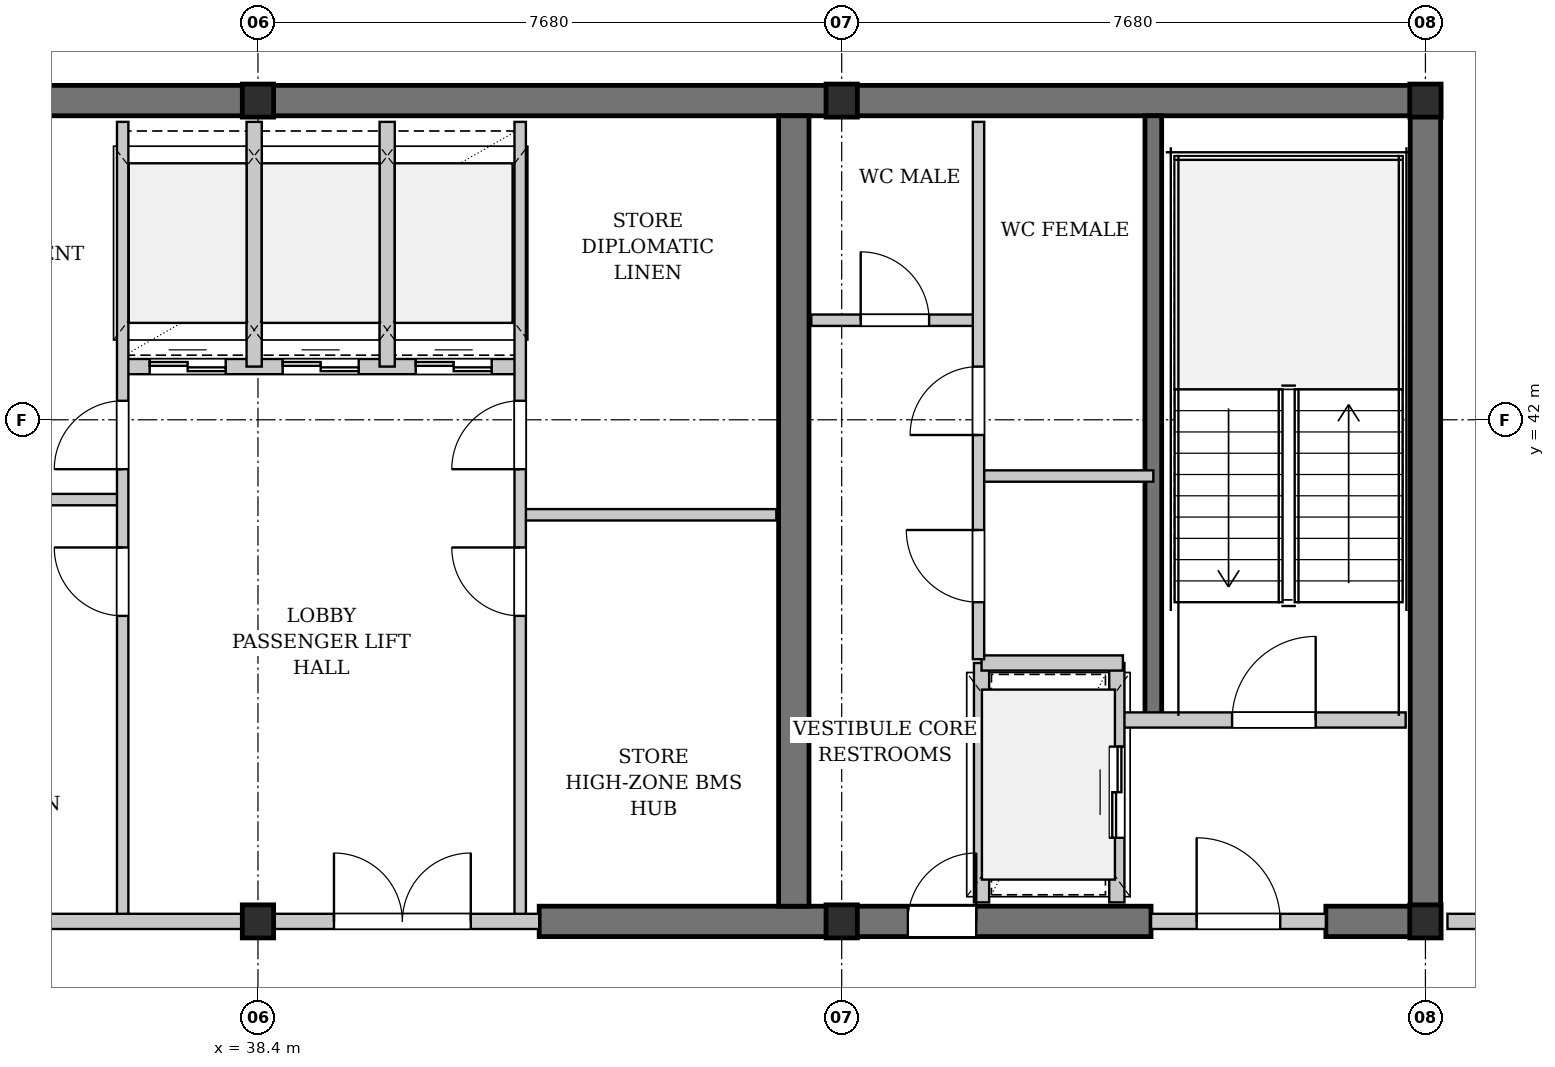
"""IFC4 building model, lengths in metres.
Left out: names, types, materials, properties, quantities, classifications, styles, units other than length and angle.
Written with IfcOpenShell. Run it as: python <this file> out.ifc"""

import sys

from ifc_helpers import new_model, si_unit, direction, frame, frame_2d, origin, origin_2d, place, context, subcontext, project, spatial, rectangle, i_section, extrude, element, fill, save


model = new_model("IFC4")
c1 = context("Model", 3, precision=1e-05, world=origin(), true_north=direction((0.0, 1.0)))
c2 = subcontext(c1, "Body", "Model", "MODEL_VIEW")
j1 = project(units=[si_unit("LENGTHUNIT", "METRE"), si_unit("PLANEANGLEUNIT", "RADIAN")], contexts=[c1])
p1 = place(None, origin())
s1 = spatial("IfcSite", under=j1, at=p1, CompositionType="ELEMENT")
p2 = place(p1, origin())
s2 = spatial("IfcBuilding", under=s1, at=p2, CompositionType="ELEMENT")
p3 = place(p2, frame((0.0, 0.0, 247.4)))
s3 = spatial("IfcBuildingStorey", under=s2, at=p3, CompositionType="ELEMENT", Elevation=247.4)
p4 = place(p3, frame((22.84, 46.2, 0.0), z_axis=(0.0, 0.0, 1.0), x_axis=(1.0, 0.0, 0.0)))
e1 = element("IfcWall", 1, at=p4, inside=s3, PredefinedType="SHEAR", context=c2, shape_type="SweptSolid", body=[
    extrude(rectangle(XDim=31.12, YDim=0.4, at=frame_2d((15.56, 0.0))), origin(), (0.0, 0.0, 1.0), 3.68),
])
p5 = place(p3, frame((42.1, 35.4, 0.0), z_axis=(0.0, 0.0, 1.0), x_axis=(1.0, 0.0, 0.0)))
e2 = element("IfcWall", 2, at=p5, inside=s3, PredefinedType="SHEAR", context=c2, shape_type="SweptSolid", body=[
    extrude(rectangle(XDim=8.05, YDim=0.4, at=frame_2d((4.025, 0.0))), origin(), (0.0, 0.0, 1.0), 3.68),
])
p6 = place(p5, frame((4.85, 0.0, 0.0)))
e3 = element("IfcOpeningElement", 3, at=p6, cuts=e2, PredefinedType="OPENING", context=c2, shape_type="SweptSolid", body=[
    extrude(rectangle(XDim=0.9, YDim=2.15, at=frame_2d((0.45, 1.075))), frame((0.0, 0.21, 0.0), z_axis=(0.0, -1.0, 0.0), x_axis=(1.0, 0.0, 0.0)), (0.0, 0.0, 1.0), 0.42),
])
p7 = place(p3, frame((52.45, 35.4, 0.0), z_axis=(0.0, 0.0, 1.0), x_axis=(1.0, 0.0, 0.0)))
e4 = element("IfcWall", 4, at=p7, inside=s3, PredefinedType="SHEAR", context=c2, shape_type="SweptSolid", body=[
    extrude(rectangle(XDim=1.51, YDim=0.4, at=frame_2d((0.755, 0.0))), origin(), (0.0, 0.0, 1.0), 3.68),
])
for number, where, z_axis, x_axis in (
    (5, (45.45, 35.6, 0.0), (0.0, 0.0, 1.0), (0.0, 1.0, 0.0)),
    (6, (53.76, 35.6, 0.0), (0.0, 0.0, 1.0), (0.0, 1.0, 0.0)),
):
    element("IfcWall", number, at=place(p3, frame(where, z_axis=z_axis, x_axis=x_axis)), inside=s3, PredefinedType="SHEAR", context=c2, shape_type="SweptSolid", body=[
        extrude(rectangle(XDim=10.4, YDim=0.4, at=frame_2d((5.2, 0.0))), origin(), (0.0, 0.0, 1.0), 3.68),
    ])
p8 = place(p3, frame((50.18, 38.05, 0.0), z_axis=(0.0, 0.0, 1.0), x_axis=(0.0, 1.0, 0.0)))
e7 = element("IfcWall", 7, at=p8, inside=s3, PredefinedType="SHEAR", context=c2, shape_type="SweptSolid", body=[
    extrude(rectangle(XDim=7.95, YDim=0.22, at=frame_2d((3.975, 0.0))), origin(), (0.0, 0.0, 1.0), 3.68),
])
for number, where, z_axis, x_axis in (
    (8, (38.4, 35.4, 0.0), (0.0, 0.0, 1.0), (1.0, 0.0, 0.0)),
    (9, (38.4, 46.2, 0.0), (0.0, 0.0, 1.0), (1.0, 0.0, 0.0)),
    (10, (46.08, 35.4, 0.0), (0.0, 0.0, 1.0), (1.0, 0.0, 0.0)),
    (11, (46.08, 46.2, 0.0), (0.0, 0.0, 1.0), (1.0, 0.0, 0.0)),
    (12, (53.76, 35.4, 0.0), (0.0, 0.0, 1.0), (1.0, 0.0, 0.0)),
    (13, (53.76, 46.2, 0.0), (0.0, 0.0, 1.0), (1.0, 0.0, 0.0)),
):
    element("IfcColumn", number, at=place(p3, frame(where, z_axis=z_axis, x_axis=x_axis)), inside=s3, PredefinedType="COLUMN", context=c2, shape_type="SweptSolid", body=[
        extrude(i_section(OverallWidth=0.412, OverallDepth=0.435, WebThickness=0.036, FlangeThickness=0.058, FilletRadius=0.015, at=origin_2d()), origin(), (0.0, 0.0, 1.0), 3.9),
    ])
p9 = place(p3, frame((35.6, 35.4, 0.0), z_axis=(0.0, 0.0, 1.0), x_axis=(1.0, 0.0, 0.0)))
e14 = element("IfcWall", 14, at=p9, inside=s3, PredefinedType="PARTITIONING", context=c2, shape_type="SweptSolid", body=[
    extrude(rectangle(XDim=6.5, YDim=0.2, at=frame_2d((3.25, 0.0))), origin(), (0.0, 0.0, 1.0), 2.861),
])
p10 = place(p9, frame((3.8, 0.0, 0.0)))
e15 = element("IfcOpeningElement", 15, at=p10, cuts=e14, PredefinedType="OPENING", context=c2, shape_type="SweptSolid", body=[
    extrude(rectangle(XDim=1.8, YDim=2.3, at=frame_2d((0.9, 1.15))), frame((0.0, 0.11, 0.0), z_axis=(0.0, -1.0, 0.0), x_axis=(1.0, 0.0, 0.0)), (0.0, 0.0, 1.0), 0.22),
])
p11 = place(p3, frame((36.6, 42.7, 0.0), z_axis=(0.0, 0.0, 1.0), x_axis=(1.0, 0.0, 0.0)))
e16 = element("IfcWall", 16, at=p11, inside=s3, PredefinedType="PARTITIONING", context=c2, shape_type="SweptSolid", body=[
    extrude(rectangle(XDim=5.25, YDim=0.2, at=frame_2d((2.625, 0.0))), origin(), (0.0, 0.0, 1.0), 3.68),
])
p12 = place(p11, frame((0.375, 0.0, 0.0)))
e17 = element("IfcOpeningElement", 17, at=p12, cuts=e16, PredefinedType="OPENING", context=c2, shape_type="SweptSolid", body=[
    extrude(rectangle(XDim=1.0, YDim=2.2, at=frame_2d((0.5, 1.1))), frame((0.0, 0.11, 0.0), z_axis=(0.0, -1.0, 0.0), x_axis=(1.0, 0.0, 0.0)), (0.0, 0.0, 1.0), 0.22),
])
p13 = place(p11, frame((2.125, 0.0, 0.0)))
e18 = element("IfcOpeningElement", 18, at=p13, cuts=e16, PredefinedType="OPENING", context=c2, shape_type="SweptSolid", body=[
    extrude(rectangle(XDim=1.0, YDim=2.2, at=frame_2d((0.5, 1.1))), frame((0.0, 0.11, 0.0), z_axis=(0.0, -1.0, 0.0), x_axis=(1.0, 0.0, 0.0)), (0.0, 0.0, 1.0), 0.22),
])
p14 = place(p11, frame((3.875, 0.0, 0.0)))
e19 = element("IfcOpeningElement", 19, at=p14, cuts=e16, PredefinedType="OPENING", context=c2, shape_type="SweptSolid", body=[
    extrude(rectangle(XDim=1.0, YDim=2.2, at=frame_2d((0.5, 1.1))), frame((0.0, 0.11, 0.0), z_axis=(0.0, -1.0, 0.0), x_axis=(1.0, 0.0, 0.0)), (0.0, 0.0, 1.0), 0.22),
])
p15 = place(p3, frame((38.35, 42.7, 0.0), z_axis=(0.0, 0.0, 1.0), x_axis=(0.0, 1.0, 0.0)))
e20 = element("IfcWall", 20, at=p15, inside=s3, PredefinedType="PARTITIONING", context=c2, shape_type="SweptSolid", body=[
    extrude(rectangle(XDim=3.22, YDim=0.2, at=frame_2d((1.61, 0.0))), origin(), (0.0, 0.0, 1.0), 2.861),
])
p16 = place(p3, frame((40.1, 42.7, 0.0), z_axis=(0.0, 0.0, 1.0), x_axis=(0.0, 1.0, 0.0)))
e21 = element("IfcWall", 21, at=p16, inside=s3, PredefinedType="PARTITIONING", context=c2, shape_type="SweptSolid", body=[
    extrude(rectangle(XDim=3.22, YDim=0.2, at=frame_2d((1.61, 0.0))), origin(), (0.0, 0.0, 1.0), 3.68),
])
p17 = place(p3, frame((33.05, 40.95, 0.0), z_axis=(0.0, 0.0, 1.0), x_axis=(1.0, 0.0, 0.0)))
e22 = element("IfcWall", 22, at=p17, inside=s3, PredefinedType="PARTITIONING", context=c2, shape_type="SweptSolid", body=[
    extrude(rectangle(XDim=3.57, YDim=0.15, at=frame_2d((1.785, 0.0))), origin(), (0.0, 0.0, 1.0), 3.68),
])
p18 = place(p3, frame((36.62, 35.5, 0.0), z_axis=(0.0, 0.0, 1.0), x_axis=(0.0, 1.0, 0.0)))
e23 = element("IfcWall", 23, at=p18, inside=s3, PredefinedType="PARTITIONING", context=c2, shape_type="SweptSolid", body=[
    extrude(rectangle(XDim=10.42, YDim=0.15, at=frame_2d((5.21, 0.0))), origin(), (0.0, 0.0, 1.0), 3.68),
])
p19 = place(p18, frame((3.92, 0.0, 0.0)))
e24 = element("IfcOpeningElement", 24, at=p19, cuts=e23, PredefinedType="OPENING", context=c2, shape_type="SweptSolid", body=[
    extrude(rectangle(XDim=0.9, YDim=2.15, at=frame_2d((0.45, 1.075))), frame((0.0, 0.085, 0.0), z_axis=(0.0, -1.0, 0.0), x_axis=(1.0, 0.0, 0.0)), (0.0, 0.0, 1.0), 0.17),
])
p20 = place(p18, frame((5.85, 0.0, 0.0)))
e25 = element("IfcOpeningElement", 25, at=p20, cuts=e23, PredefinedType="OPENING", context=c2, shape_type="SweptSolid", body=[
    extrude(rectangle(XDim=0.9, YDim=2.15, at=frame_2d((0.45, 1.075))), frame((0.0, 0.085, 0.0), z_axis=(0.0, -1.0, 0.0), x_axis=(1.0, 0.0, 0.0)), (0.0, 0.0, 1.0), 0.17),
])
p21 = place(p3, frame((41.85, 40.75, 0.0), z_axis=(0.0, 0.0, 1.0), x_axis=(1.0, 0.0, 0.0)))
e26 = element("IfcWall", 26, at=p21, inside=s3, PredefinedType="PARTITIONING", context=c2, shape_type="SweptSolid", body=[
    extrude(rectangle(XDim=3.37, YDim=0.15, at=frame_2d((1.685, 0.0))), origin(), (0.0, 0.0, 1.0), 3.68),
])
p22 = place(p3, frame((41.85, 35.5, 0.0), z_axis=(0.0, 0.0, 1.0), x_axis=(0.0, 1.0, 0.0)))
e27 = element("IfcWall", 27, at=p22, inside=s3, PredefinedType="PARTITIONING", context=c2, shape_type="SweptSolid", body=[
    extrude(rectangle(XDim=10.42, YDim=0.15, at=frame_2d((5.21, 0.0))), origin(), (0.0, 0.0, 1.0), 3.68),
])
p23 = place(p22, frame((3.92, 0.0, 0.0)))
e28 = element("IfcOpeningElement", 28, at=p23, cuts=e27, PredefinedType="OPENING", context=c2, shape_type="SweptSolid", body=[
    extrude(rectangle(XDim=0.9, YDim=2.15, at=frame_2d((0.45, 1.075))), frame((0.0, 0.085, 0.0), z_axis=(0.0, -1.0, 0.0), x_axis=(1.0, 0.0, 0.0)), (0.0, 0.0, 1.0), 0.17),
])
p24 = place(p22, frame((5.85, 0.0, 0.0)))
e29 = element("IfcOpeningElement", 29, at=p24, cuts=e27, PredefinedType="OPENING", context=c2, shape_type="SweptSolid", body=[
    extrude(rectangle(XDim=0.9, YDim=2.15, at=frame_2d((0.45, 1.075))), frame((0.0, 0.085, 0.0), z_axis=(0.0, -1.0, 0.0), x_axis=(1.0, 0.0, 0.0)), (0.0, 0.0, 1.0), 0.17),
])
p25 = place(p3, frame((49.78, 38.05, 0.0), z_axis=(0.0, 0.0, 1.0), x_axis=(1.0, 0.0, 0.0)))
e30 = element("IfcWall", 30, at=p25, inside=s3, PredefinedType="PARTITIONING", context=c2, shape_type="SweptSolid", body=[
    extrude(rectangle(XDim=3.72, YDim=0.2, at=frame_2d((1.86, 0.0))), origin(), (0.0, 0.0, 1.0), 3.68),
])
p26 = place(p25, frame((1.436, 0.0, 0.0)))
e31 = element("IfcOpeningElement", 31, at=p26, cuts=e30, PredefinedType="OPENING", context=c2, shape_type="SweptSolid", body=[
    extrude(rectangle(XDim=1.1, YDim=2.15, at=frame_2d((0.55, 1.075))), frame((0.0, 0.11, 0.0), z_axis=(0.0, -1.0, 0.0), x_axis=(1.0, 0.0, 0.0)), (0.0, 0.0, 1.0), 0.22),
])
p27 = place(p3, frame((50.15, 35.4, 0.0), z_axis=(0.0, 0.0, 1.0), x_axis=(1.0, 0.0, 0.0)))
e32 = element("IfcWall", 32, at=p27, inside=s3, PredefinedType="PARTITIONING", context=c2, shape_type="SweptSolid", body=[
    extrude(rectangle(XDim=2.3, YDim=0.2, at=frame_2d((1.15, 0.0))), origin(), (0.0, 0.0, 1.0), 2.861),
])
p28 = place(p27, frame((0.6, 0.0, 0.0)))
e33 = element("IfcOpeningElement", 33, at=p28, cuts=e32, PredefinedType="OPENING", context=c2, shape_type="SweptSolid", body=[
    extrude(rectangle(XDim=1.1, YDim=2.15, at=frame_2d((0.55, 1.075))), frame((0.0, 0.11, 0.0), z_axis=(0.0, -1.0, 0.0), x_axis=(1.0, 0.0, 0.0)), (0.0, 0.0, 1.0), 0.22),
])
p29 = place(p3, frame((49.7, 35.65, 0.0), z_axis=(0.0, 0.0, 1.0), x_axis=(0.0, 1.0, 0.0)))
e34 = element("IfcWall", 34, at=p29, inside=s3, PredefinedType="PARTITIONING", context=c2, shape_type="SweptSolid", body=[
    extrude(rectangle(XDim=3.15, YDim=0.2, at=frame_2d((1.575, 0.0))), origin(), (0.0, 0.0, 1.0), 3.68),
])
p30 = place(p29, frame((0.85, 0.0, 0.0)))
e35 = element("IfcOpeningElement", 35, at=p30, cuts=e34, PredefinedType="OPENING", context=c2, shape_type="SweptSolid", body=[
    extrude(rectangle(XDim=1.2, YDim=2.2, at=frame_2d((0.6, 1.1))), frame((0.0, 0.11, 0.0), z_axis=(0.0, -1.0, 0.0), x_axis=(1.0, 0.0, 0.0)), (0.0, 0.0, 1.0), 0.22),
])
p31 = place(p3, frame((47.92, 35.65, 0.0), z_axis=(0.0, 0.0, 1.0), x_axis=(0.0, 1.0, 0.0)))
e36 = element("IfcWall", 36, at=p31, inside=s3, PredefinedType="PARTITIONING", context=c2, shape_type="SweptSolid", body=[
    extrude(rectangle(XDim=3.15, YDim=0.2, at=frame_2d((1.575, 0.0))), origin(), (0.0, 0.0, 1.0), 3.68),
])
p32 = place(p3, frame((47.92, 38.8, 0.0), z_axis=(0.0, 0.0, 1.0), x_axis=(1.0, 0.0, 0.0)))
e37 = element("IfcWall", 37, at=p32, inside=s3, PredefinedType="PARTITIONING", context=c2, shape_type="SweptSolid", body=[
    extrude(rectangle(XDim=1.86, YDim=0.2, at=frame_2d((0.93, 0.0))), origin(), (0.0, 0.0, 1.0), 3.68),
])
p33 = place(p3, frame((45.68, 43.31, 0.0), z_axis=(0.0, 0.0, 1.0), x_axis=(1.0, 0.0, 0.0)))
e38 = element("IfcWall", 38, at=p33, inside=s3, PredefinedType="PARTITIONING", context=c2, shape_type="SweptSolid", body=[
    extrude(rectangle(XDim=2.2, YDim=0.15, at=frame_2d((1.1, 0.0))), origin(), (0.0, 0.0, 1.0), 3.68),
])
p34 = place(p33, frame((0.65, 0.0, 0.0)))
e39 = element("IfcOpeningElement", 39, at=p34, cuts=e38, PredefinedType="OPENING", context=c2, shape_type="SweptSolid", body=[
    extrude(rectangle(XDim=0.9, YDim=2.15, at=frame_2d((0.45, 1.075))), frame((0.0, 0.085, 0.0), z_axis=(0.0, -1.0, 0.0), x_axis=(1.0, 0.0, 0.0)), (0.0, 0.0, 1.0), 0.17),
])
p35 = place(p3, frame((47.88, 41.26, 0.0), z_axis=(0.0, 0.0, 1.0), x_axis=(1.0, 0.0, 0.0)))
e40 = element("IfcWall", 40, at=p35, inside=s3, PredefinedType="PARTITIONING", context=c2, shape_type="SweptSolid", body=[
    extrude(rectangle(XDim=2.3, YDim=0.15, at=frame_2d((1.15, 0.0))), origin(), (0.0, 0.0, 1.0), 3.68),
])
p36 = place(p3, frame((47.88, 38.85, 0.0), z_axis=(0.0, 0.0, 1.0), x_axis=(0.0, 1.0, 0.0)))
e41 = element("IfcWall", 41, at=p36, inside=s3, PredefinedType="PARTITIONING", context=c2, shape_type="SweptSolid", body=[
    extrude(rectangle(XDim=7.07, YDim=0.15, at=frame_2d((3.535, 0.0))), origin(), (0.0, 0.0, 1.0), 3.68),
])
p37 = place(p36, frame((0.75, 0.0, 0.0)))
e42 = element("IfcOpeningElement", 42, at=p37, cuts=e41, PredefinedType="OPENING", context=c2, shape_type="SweptSolid", body=[
    extrude(rectangle(XDim=0.95, YDim=2.15, at=frame_2d((0.475, 1.075))), frame((0.0, 0.085, 0.0), z_axis=(0.0, -1.0, 0.0), x_axis=(1.0, 0.0, 0.0)), (0.0, 0.0, 1.0), 0.17),
])
p38 = place(p36, frame((2.95, 0.0, 0.0)))
e43 = element("IfcOpeningElement", 43, at=p38, cuts=e41, PredefinedType="OPENING", context=c2, shape_type="SweptSolid", body=[
    extrude(rectangle(XDim=0.9, YDim=2.15, at=frame_2d((0.45, 1.075))), frame((0.0, 0.085, 0.0), z_axis=(0.0, -1.0, 0.0), x_axis=(1.0, 0.0, 0.0)), (0.0, 0.0, 1.0), 0.17),
])
p39 = place(p3, frame((54.05, 35.4, 0.0), z_axis=(0.0, 0.0, 1.0), x_axis=(1.0, 0.0, 0.0)))
e44 = element("IfcWall", 44, at=p39, inside=s3, PredefinedType="PARTITIONING", context=c2, shape_type="SweptSolid", body=[
    extrude(rectangle(XDim=3.8, YDim=0.2, at=frame_2d((1.9, 0.0))), origin(), (0.0, 0.0, 1.0), 3.68),
])
p40 = place(p39, frame((1.35, 0.0, 0.0)))
e45 = element("IfcOpeningElement", 45, at=p40, cuts=e44, PredefinedType="OPENING", context=c2, shape_type="SweptSolid", body=[
    extrude(rectangle(XDim=1.1, YDim=2.15, at=frame_2d((0.55, 1.075))), frame((0.0, 0.11, 0.0), z_axis=(0.0, -1.0, 0.0), x_axis=(1.0, 0.0, 0.0)), (0.0, 0.0, 1.0), 0.22),
])
p41 = place(p10, origin())
e46 = element("IfcDoor", 46, at=p41, inside=s3, OperationType="DOUBLE_DOOR_SINGLE_SWING", PredefinedType="DOOR", context=c2, shape_type="SweptSolid", body=[
    extrude(rectangle(XDim=1.8, YDim=2.3, at=frame_2d((0.9, 1.15))), frame((0.0, 0.025, 0.0), z_axis=(0.0, -1.0, 0.0), x_axis=(1.0, 0.0, 0.0)), (0.0, 0.0, 1.0), 0.05),
])
fill(e15, e46)
p42 = place(p12, origin())
e47 = element("IfcDoor", 47, at=p42, inside=s3, OperationType="DOUBLE_DOOR_SLIDING", PredefinedType="DOOR", context=c2, shape_type="SweptSolid", body=[
    extrude(rectangle(XDim=1.0, YDim=2.2, at=frame_2d((0.5, 1.1))), frame((0.0, 0.025, 0.0), z_axis=(0.0, -1.0, 0.0), x_axis=(1.0, 0.0, 0.0)), (0.0, 0.0, 1.0), 0.05),
])
fill(e17, e47)
p43 = place(p13, origin())
e48 = element("IfcDoor", 48, at=p43, inside=s3, OperationType="DOUBLE_DOOR_SLIDING", PredefinedType="DOOR", context=c2, shape_type="SweptSolid", body=[
    extrude(rectangle(XDim=1.0, YDim=2.2, at=frame_2d((0.5, 1.1))), frame((0.0, 0.025, 0.0), z_axis=(0.0, -1.0, 0.0), x_axis=(1.0, 0.0, 0.0)), (0.0, 0.0, 1.0), 0.05),
])
fill(e18, e48)
p44 = place(p14, origin())
e49 = element("IfcDoor", 49, at=p44, inside=s3, OperationType="DOUBLE_DOOR_SLIDING", PredefinedType="DOOR", context=c2, shape_type="SweptSolid", body=[
    extrude(rectangle(XDim=1.0, YDim=2.2, at=frame_2d((0.5, 1.1))), frame((0.0, 0.025, 0.0), z_axis=(0.0, -1.0, 0.0), x_axis=(1.0, 0.0, 0.0)), (0.0, 0.0, 1.0), 0.05),
])
fill(e19, e49)
p45 = place(p19, origin())
e50 = element("IfcDoor", 50, at=p45, inside=s3, OperationType="SINGLE_SWING_RIGHT", PredefinedType="DOOR", context=c2, shape_type="SweptSolid", body=[
    extrude(rectangle(XDim=0.9, YDim=2.15, at=frame_2d((0.45, 1.075))), frame((0.0, 0.025, 0.0), z_axis=(0.0, -1.0, 0.0), x_axis=(1.0, 0.0, 0.0)), (0.0, 0.0, 1.0), 0.05),
])
fill(e24, e50)
p46 = place(p20, origin())
e51 = element("IfcDoor", 51, at=p46, inside=s3, OperationType="SINGLE_SWING_LEFT", PredefinedType="DOOR", context=c2, shape_type="SweptSolid", body=[
    extrude(rectangle(XDim=0.9, YDim=2.15, at=frame_2d((0.45, 1.075))), frame((0.0, 0.025, 0.0), z_axis=(0.0, -1.0, 0.0), x_axis=(1.0, 0.0, 0.0)), (0.0, 0.0, 1.0), 0.05),
])
fill(e25, e51)
p47 = place(p23, origin())
e52 = element("IfcDoor", 52, at=p47, inside=s3, OperationType="SINGLE_SWING_RIGHT", PredefinedType="DOOR", context=c2, shape_type="SweptSolid", body=[
    extrude(rectangle(XDim=0.9, YDim=2.15, at=frame_2d((0.45, 1.075))), frame((0.0, 0.025, 0.0), z_axis=(0.0, -1.0, 0.0), x_axis=(1.0, 0.0, 0.0)), (0.0, 0.0, 1.0), 0.05),
])
fill(e28, e52)
p48 = place(p24, origin())
e53 = element("IfcDoor", 53, at=p48, inside=s3, OperationType="SINGLE_SWING_LEFT", PredefinedType="DOOR", context=c2, shape_type="SweptSolid", body=[
    extrude(rectangle(XDim=0.9, YDim=2.15, at=frame_2d((0.45, 1.075))), frame((0.0, 0.025, 0.0), z_axis=(0.0, -1.0, 0.0), x_axis=(1.0, 0.0, 0.0)), (0.0, 0.0, 1.0), 0.05),
])
fill(e29, e53)
p49 = place(p26, origin())
e54 = element("IfcDoor", 54, at=p49, inside=s3, OperationType="SINGLE_SWING_RIGHT", PredefinedType="DOOR", context=c2, shape_type="SweptSolid", body=[
    extrude(rectangle(XDim=1.1, YDim=2.15, at=frame_2d((0.55, 1.075))), frame((0.0, 0.025, 0.0), z_axis=(0.0, -1.0, 0.0), x_axis=(1.0, 0.0, 0.0)), (0.0, 0.0, 1.0), 0.05),
])
fill(e31, e54)
p50 = place(p28, origin())
e55 = element("IfcDoor", 55, at=p50, inside=s3, OperationType="SINGLE_SWING_LEFT", PredefinedType="DOOR", context=c2, shape_type="SweptSolid", body=[
    extrude(rectangle(XDim=1.1, YDim=2.15, at=frame_2d((0.55, 1.075))), frame((0.0, 0.025, 0.0), z_axis=(0.0, -1.0, 0.0), x_axis=(1.0, 0.0, 0.0)), (0.0, 0.0, 1.0), 0.05),
])
fill(e33, e55)
p51 = place(p30, origin())
e56 = element("IfcDoor", 56, at=p51, inside=s3, OperationType="DOUBLE_DOOR_SLIDING", PredefinedType="DOOR", context=c2, shape_type="SweptSolid", body=[
    extrude(rectangle(XDim=1.2, YDim=2.2, at=frame_2d((0.6, 1.1))), frame((0.0, 0.025, 0.0), z_axis=(0.0, -1.0, 0.0), x_axis=(1.0, 0.0, 0.0)), (0.0, 0.0, 1.0), 0.05),
])
fill(e35, e56)
p52 = place(p34, origin())
e57 = element("IfcDoor", 57, at=p52, inside=s3, OperationType="SINGLE_SWING_LEFT", PredefinedType="DOOR", context=c2, shape_type="SweptSolid", body=[
    extrude(rectangle(XDim=0.9, YDim=2.15, at=frame_2d((0.45, 1.075))), frame((0.0, 0.025, 0.0), z_axis=(0.0, -1.0, 0.0), x_axis=(1.0, 0.0, 0.0)), (0.0, 0.0, 1.0), 0.05),
])
fill(e39, e57)
p53 = place(p37, origin())
e58 = element("IfcDoor", 58, at=p53, inside=s3, OperationType="SINGLE_SWING_RIGHT", PredefinedType="DOOR", context=c2, shape_type="SweptSolid", body=[
    extrude(rectangle(XDim=0.95, YDim=2.15, at=frame_2d((0.475, 1.075))), frame((0.0, 0.025, 0.0), z_axis=(0.0, -1.0, 0.0), x_axis=(1.0, 0.0, 0.0)), (0.0, 0.0, 1.0), 0.05),
])
fill(e42, e58)
p54 = place(p38, origin())
e59 = element("IfcDoor", 59, at=p54, inside=s3, OperationType="SINGLE_SWING_LEFT", PredefinedType="DOOR", context=c2, shape_type="SweptSolid", body=[
    extrude(rectangle(XDim=0.9, YDim=2.15, at=frame_2d((0.45, 1.075))), frame((0.0, 0.025, 0.0), z_axis=(0.0, -1.0, 0.0), x_axis=(1.0, 0.0, 0.0)), (0.0, 0.0, 1.0), 0.05),
])
fill(e43, e59)
p55 = place(p6, origin())
e60 = element("IfcDoor", 60, at=p55, inside=s3, OperationType="SINGLE_SWING_RIGHT", PredefinedType="DOOR", context=c2, shape_type="SweptSolid", body=[
    extrude(rectangle(XDim=0.9, YDim=2.15, at=frame_2d((0.45, 1.075))), frame((0.0, 0.025, 0.0), z_axis=(0.0, -1.0, 0.0), x_axis=(1.0, 0.0, 0.0)), (0.0, 0.0, 1.0), 0.05),
])
fill(e3, e60)
save(model, sys.argv[1])
